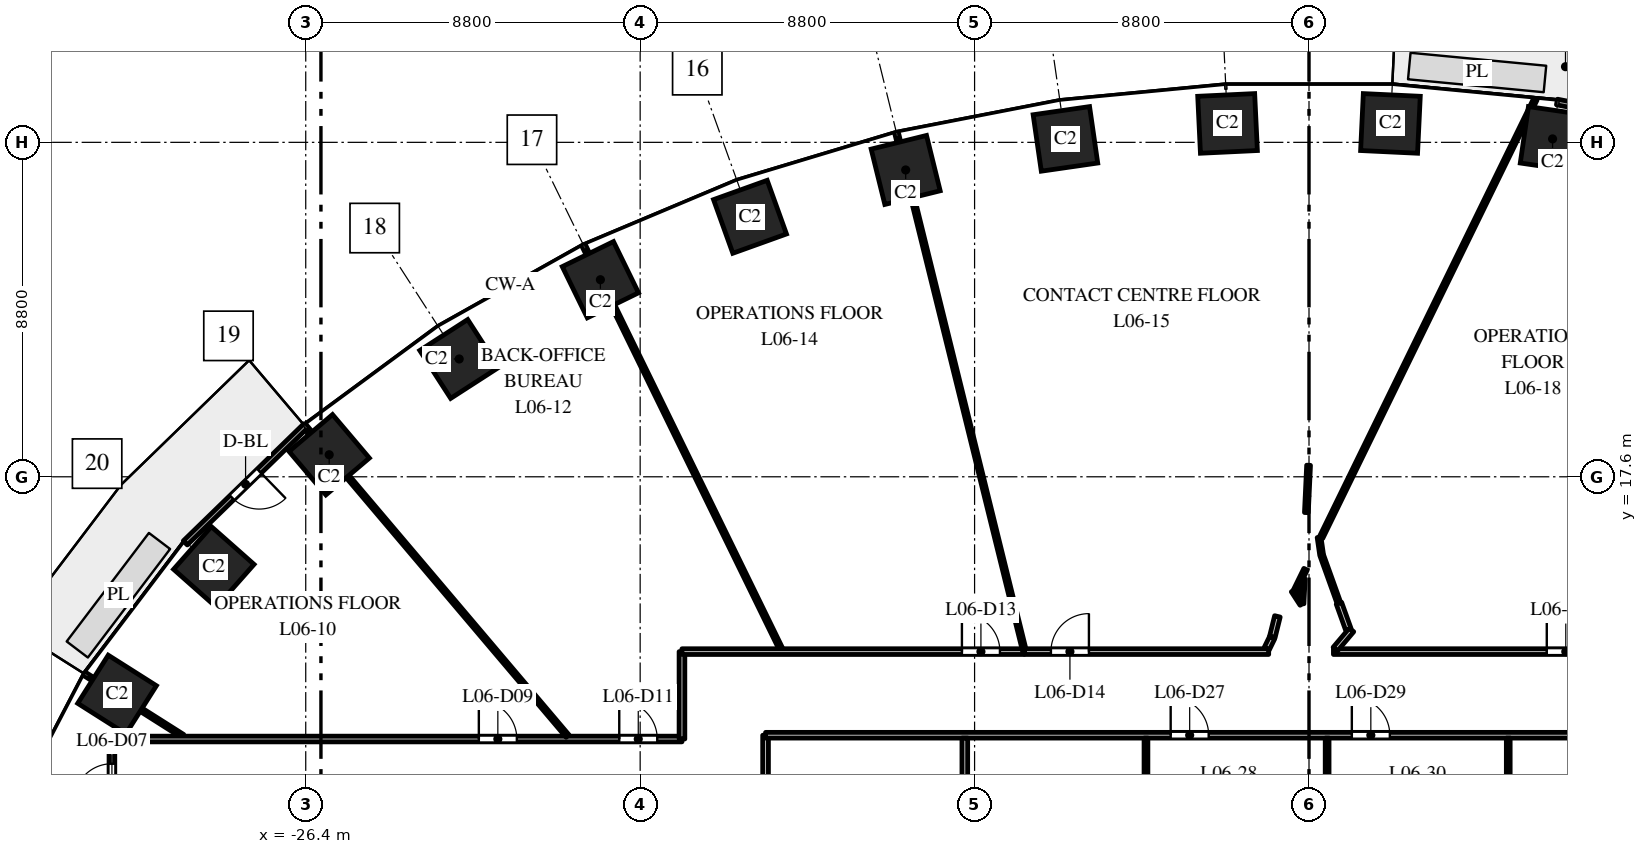
"""IFC4 building model, lengths in metres.
Left out: names, types, materials, properties, quantities, classifications, styles, units other than length and angle.
Written with IfcOpenShell. Run it as: python <this file> out.ifc"""

import sys

from ifc_helpers import new_model, si_unit, direction, frame, frame_2d, origin, origin_2d, place, context, subcontext, project, spatial, rectangle, extrude, element, fill, save


model = new_model("IFC4")
c1 = context("Model", 3, precision=1e-05, world=origin(), true_north=direction((0.0, 1.0)))
c2 = subcontext(c1, "Body", "Model", "MODEL_VIEW")
j1 = project(units=[si_unit("LENGTHUNIT", "METRE"), si_unit("PLANEANGLEUNIT", "RADIAN")], contexts=[c1])
p1 = place(None, origin())
s1 = spatial("IfcSite", under=j1, at=p1, CompositionType="ELEMENT")
p2 = place(p1, origin())
s2 = spatial("IfcBuilding", under=s1, at=p2, CompositionType="ELEMENT")
p3 = place(p2, frame((0.0, 0.0, 34.5)))
s3 = spatial("IfcBuildingStorey", under=s2, at=p3, CompositionType="ELEMENT", Elevation=34.5)
for number, where, z_axis, x_axis in (
    (1, (6.409, 26.491, 0.0), (0.0, 0.0, 1.0), (-0.99, 0.143, 0.0)),
    (2, (2.143, 26.898, 0.0), (0.0, 0.0, 1.0), (-0.999, 0.048, 0.0)),
    (3, (-2.143, 26.898, 0.0), (0.0, 0.0, 1.0), (-0.999, -0.048, 0.0)),
    (4, (-6.409, 26.491, 0.0), (0.0, 0.0, 1.0), (-0.99, -0.143, 0.0)),
    (5, (-10.613, 25.674, 0.0), (0.0, 0.0, 1.0), (-0.971, -0.24, 0.0)),
    (6, (-14.709, 24.441, 0.0), (0.0, 0.0, 1.0), (-0.941, -0.338, 0.0)),
    (7, (-18.646, 22.785, 0.0), (0.0, 0.0, 1.0), (-0.898, -0.439, 0.0)),
    (8, (-22.362, 20.7, 0.0), (0.0, 0.0, 1.0), (-0.84, -0.542, 0.0)),
    (9, (-25.783, 18.18, 0.0), (0.0, 0.0, 1.0), (-0.763, -0.646, 0.0)),
    (10, (-28.819, 15.23, 0.0), (0.0, 0.0, 1.0), (-0.663, -0.749, 0.0)),
    (11, (-31.365, 11.871, 0.0), (0.0, 0.0, 1.0), (-0.535, -0.845, 0.0)),
):
    element("IfcColumn", number, at=place(p3, frame(where, z_axis=z_axis, x_axis=x_axis)), inside=s3, PredefinedType="COLUMN", context=c2, shape_type="SweptSolid", body=[
        extrude(rectangle(XDim=1.5, YDim=1.5, at=origin_2d()), origin(), (0.0, 0.0, 1.0), 4.0),
    ])
p4 = place(p3, frame((10.871, 26.617, 0.0), z_axis=(0.0, 0.0, 1.0), x_axis=(-0.981631174778, 0.190788460615, 0.0)))
e12 = element("IfcWall", 12, at=p4, inside=s3, PredefinedType="STANDARD", context=c2, shape_type="SweptSolid", body=[
    extrude(rectangle(XDim=4.426, YDim=0.15, at=frame_2d((2.213, 0.0))), origin(), (0.0, 0.0, 1.0), 3.7),
])
p5 = place(p4, frame((1.713, 0.0, 0.0)))
e13 = element("IfcOpeningElement", 13, at=p5, cuts=e12, PredefinedType="OPENING", context=c2, shape_type="SweptSolid", body=[
    extrude(rectangle(XDim=1.0, YDim=2.4, at=frame_2d((0.5, 1.2))), frame((0.0, 0.085, 0.0), z_axis=(0.0, -1.0, 0.0), x_axis=(1.0, 0.0, 0.0)), (0.0, 0.0, 1.0), 0.17),
])
p6 = place(p3, frame((-26.396, 18.943, 0.0), z_axis=(0.0, 0.0, 1.0), x_axis=(-0.717214761864, -0.696852197647, 0.0)))
e14 = element("IfcWall", 14, at=p6, inside=s3, PredefinedType="STANDARD", context=c2, shape_type="SweptSolid", body=[
    extrude(rectangle(XDim=4.424, YDim=0.15, at=frame_2d((2.212, 0.0))), origin(), (0.0, 0.0, 1.0), 3.7),
])
p7 = place(p6, frame((1.712, 0.0, 0.0)))
e15 = element("IfcOpeningElement", 15, at=p7, cuts=e14, PredefinedType="OPENING", context=c2, shape_type="SweptSolid", body=[
    extrude(rectangle(XDim=1.0, YDim=2.4, at=frame_2d((0.5, 1.2))), frame((0.0, 0.085, 0.0), z_axis=(0.0, -1.0, 0.0), x_axis=(1.0, 0.0, 0.0)), (0.0, 0.0, 1.0), 0.17),
])
p8 = place(p3, frame((-32.212, 12.408, 0.0), z_axis=(0.0, 0.0, 1.0), x_axis=(0.844810627195, -0.535065420467, 0.0)))
e16 = element("IfcWall", 16, at=p8, inside=s3, PredefinedType="PARTITIONING", context=c2, shape_type="SweptSolid", body=[
    extrude(rectangle(XDim=3.048, YDim=0.1, at=frame_2d((1.524, 0.0))), origin(), (0.0, 0.0, 1.0), 3.7),
])
p9 = place(p3, frame((-31.5, 8.5, 0.0), z_axis=(0.0, 0.0, 1.0), x_axis=(0.0, 1.0, 0.0)))
e17 = element("IfcWall", 17, at=p9, inside=s3, PredefinedType="PARTITIONING", context=c2, shape_type="SweptSolid", body=[
    extrude(rectangle(XDim=2.2, YDim=0.15, at=frame_2d((1.1, 0.0))), origin(), (0.0, 0.0, 1.0), 3.7),
])
p10 = place(p9, frame((0.55, 0.0, 0.0)))
e18 = element("IfcOpeningElement", 18, at=p10, cuts=e17, PredefinedType="OPENING", context=c2, shape_type="SweptSolid", body=[
    extrude(rectangle(XDim=1.0, YDim=2.1, at=frame_2d((0.5, 1.05))), frame((0.0, 0.085, 0.0), z_axis=(0.0, -1.0, 0.0), x_axis=(1.0, 0.0, 0.0)), (0.0, 0.0, 1.0), 0.17),
])
p11 = place(p3, frame((-31.5, 10.7, 0.0), z_axis=(0.0, 0.0, 1.0), x_axis=(1.0, 0.0, 0.0)))
e19 = element("IfcWall", 19, at=p11, inside=s3, PredefinedType="PARTITIONING", context=c2, shape_type="SweptSolid", body=[
    extrude(rectangle(XDim=15.0, YDim=0.15, at=frame_2d((7.5, 0.0))), origin(), (0.0, 0.0, 1.0), 3.1),
])
p12 = place(p11, frame((9.655, 0.0, 0.0)))
e20 = element("IfcOpeningElement", 20, at=p12, cuts=e19, PredefinedType="OPENING", context=c2, shape_type="SweptSolid", body=[
    extrude(rectangle(XDim=1.0, YDim=2.1, at=frame_2d((0.5, 1.05))), frame((0.0, 0.085, 0.0), z_axis=(0.0, -1.0, 0.0), x_axis=(1.0, 0.0, 0.0)), (0.0, 0.0, 1.0), 0.17),
])
p13 = place(p11, frame((13.35, 0.0, 0.0)))
e21 = element("IfcOpeningElement", 21, at=p13, cuts=e19, PredefinedType="OPENING", context=c2, shape_type="SweptSolid", body=[
    extrude(rectangle(XDim=1.0, YDim=2.1, at=frame_2d((0.5, 1.05))), frame((0.0, 0.085, 0.0), z_axis=(0.0, -1.0, 0.0), x_axis=(1.0, 0.0, 0.0)), (0.0, 0.0, 1.0), 0.17),
])
p14 = place(p3, frame((-26.43, 18.945, 0.0), z_axis=(0.0, 0.0, 1.0), x_axis=(0.646400187952, -0.762998556365, 0.0)))
e22 = element("IfcWall", 22, at=p14, inside=s3, PredefinedType="PARTITIONING", context=c2, shape_type="SweptSolid", body=[
    extrude(rectangle(XDim=10.704, YDim=0.1, at=frame_2d((5.352, 0.0))), origin(), (0.0, 0.0, 1.0), 3.7),
])
p15 = place(p3, frame((-19.086, 23.685, 0.0), z_axis=(0.0, 0.0, 1.0), x_axis=(0.439199750603, -0.898389436197, 0.0)))
e23 = element("IfcWall", 23, at=p15, inside=s3, PredefinedType="PARTITIONING", context=c2, shape_type="SweptSolid", body=[
    extrude(rectangle(XDim=11.81, YDim=0.1, at=frame_2d((5.905, 0.0))), origin(), (0.0, 0.0, 1.0), 3.7),
])
p16 = place(p3, frame((-16.5, 10.7, 0.0), z_axis=(0.0, 0.0, 1.0), x_axis=(0.0, 1.0, 0.0)))
e24 = element("IfcWall", 24, at=p16, inside=s3, PredefinedType="PARTITIONING", context=c2, shape_type="SweptSolid", body=[
    extrude(rectangle(XDim=2.3, YDim=0.15, at=frame_2d((1.15, 0.0))), origin(), (0.0, 0.0, 1.0), 2.75),
])
p17 = place(p3, frame((-16.5, 13.0, 0.0), z_axis=(0.0, 0.0, 1.0), x_axis=(1.0, 0.0, 0.0)))
e25 = element("IfcWall", 25, at=p17, inside=s3, PredefinedType="PARTITIONING", context=c2, shape_type="SweptSolid", body=[
    extrude(rectangle(XDim=9.001, YDim=0.15, at=frame_2d((4.5, 0.0))), origin(), (0.0, 0.0, 1.0), 2.85),
])
p18 = place(p17, frame((7.367, 0.0, 0.0)))
e26 = element("IfcOpeningElement", 26, at=p18, cuts=e25, PredefinedType="OPENING", context=c2, shape_type="SweptSolid", body=[
    extrude(rectangle(XDim=1.0, YDim=2.1, at=frame_2d((0.5, 1.05))), frame((0.0, 0.085, 0.0), z_axis=(0.0, -1.0, 0.0), x_axis=(1.0, 0.0, 0.0)), (0.0, 0.0, 1.0), 0.17),
])
p19 = place(p3, frame((-14.3, -10.8, 0.0), z_axis=(0.0, 0.0, 1.0), x_axis=(0.0, 1.0, 0.0)))
e27 = element("IfcWall", 27, at=p19, inside=s3, PredefinedType="PARTITIONING", context=c2, shape_type="SweptSolid", body=[
    extrude(rectangle(XDim=21.6, YDim=0.15, at=frame_2d((10.8, 0.0))), origin(), (0.0, 0.0, 1.0), 2.75),
])
p20 = place(p19, frame((0.65, 0.0, 0.0)))
e28 = element("IfcOpeningElement", 28, at=p20, cuts=e27, PredefinedType="OPENING", context=c2, shape_type="SweptSolid", body=[
    extrude(rectangle(XDim=1.0, YDim=2.1, at=frame_2d((0.5, 1.05))), frame((0.0, 0.085, 0.0), z_axis=(0.0, -1.0, 0.0), x_axis=(1.0, 0.0, 0.0)), (0.0, 0.0, 1.0), 0.17),
])
p21 = place(p3, frame((-14.3, 10.8, 0.0), z_axis=(0.0, 0.0, 1.0), x_axis=(1.0, 0.0, 0.0)))
e29 = element("IfcWall", 29, at=p21, inside=s3, PredefinedType="PARTITIONING", context=c2, shape_type="SweptSolid", body=[
    extrude(rectangle(XDim=28.6, YDim=0.15, at=frame_2d((14.3, 0.0))), origin(), (0.0, 0.0, 1.0), 2.85),
])
p22 = place(p21, frame((10.66, 0.0, 0.0)))
e30 = element("IfcOpeningElement", 30, at=p22, cuts=e29, PredefinedType="OPENING", context=c2, shape_type="SweptSolid", body=[
    extrude(rectangle(XDim=1.0, YDim=2.1, at=frame_2d((0.5, 1.05))), frame((0.0, 0.085, 0.0), z_axis=(0.0, -1.0, 0.0), x_axis=(1.0, 0.0, 0.0)), (0.0, 0.0, 1.0), 0.17),
])
p23 = place(p21, frame((15.427, 0.0, 0.0)))
e31 = element("IfcOpeningElement", 31, at=p23, cuts=e29, PredefinedType="OPENING", context=c2, shape_type="SweptSolid", body=[
    extrude(rectangle(XDim=1.0, YDim=2.1, at=frame_2d((0.5, 1.05))), frame((0.0, 0.085, 0.0), z_axis=(0.0, -1.0, 0.0), x_axis=(1.0, 0.0, 0.0)), (0.0, 0.0, 1.0), 0.17),
])
p24 = place(p21, frame((22.693, 0.0, 0.0)))
e32 = element("IfcOpeningElement", 32, at=p24, cuts=e29, PredefinedType="OPENING", context=c2, shape_type="SweptSolid", body=[
    extrude(rectangle(XDim=1.0, YDim=2.1, at=frame_2d((0.5, 1.05))), frame((0.0, 0.085, 0.0), z_axis=(0.0, -1.0, 0.0), x_axis=(1.0, 0.0, 0.0)), (0.0, 0.0, 1.0), 0.17),
])
p25 = place(p3, frame((-10.853, 26.646, 0.0), z_axis=(0.0, 0.0, 1.0), x_axis=(0.239763745499, -0.97083126564, 0.0)))
e33 = element("IfcWall", 33, at=p25, inside=s3, PredefinedType="PARTITIONING", context=c2, shape_type="SweptSolid", body=[
    extrude(rectangle(XDim=14.056, YDim=0.1, at=frame_2d((7.028, 0.0))), origin(), (0.0, 0.0, 1.0), 2.85),
])
p26 = place(p3, frame((-9.057, 0.045, 0.0), z_axis=(0.0, 0.0, 1.0), x_axis=(0.0, 1.0, 0.0)))
e34 = element("IfcWall", 34, at=p26, inside=s3, PredefinedType="PARTITIONING", context=c2, shape_type="SweptSolid", body=[
    extrude(rectangle(XDim=10.68, YDim=0.15, at=frame_2d((5.34, 0.0))), origin(), (0.0, 0.0, 1.0), 2.75),
])
p27 = place(p26, frame((4.61, 0.0, 0.0)))
e35 = element("IfcOpeningElement", 35, at=p27, cuts=e34, PredefinedType="OPENING", context=c2, shape_type="SweptSolid", body=[
    extrude(rectangle(XDim=1.0, YDim=2.1, at=frame_2d((0.5, 1.05))), frame((0.0, 0.085, 0.0), z_axis=(0.0, -1.0, 0.0), x_axis=(1.0, 0.0, 0.0)), (0.0, 0.0, 1.0), 0.17),
])
p28 = place(p3, frame((-7.483, 13.0, 0.0), z_axis=(0.0, 0.0, 1.0), x_axis=(1.0, 0.0, 0.0)))
e36 = element("IfcWall", 36, at=p28, inside=s3, PredefinedType="PARTITIONING", context=c2, shape_type="SweptSolid", body=[
    extrude(rectangle(XDim=6.422, YDim=0.15, at=frame_2d((3.211, 0.0))), origin(), (0.0, 0.0, 1.0), 2.85),
])
p29 = place(p28, frame((0.692, 0.0, 0.0)))
e37 = element("IfcOpeningElement", 37, at=p29, cuts=e36, PredefinedType="OPENING", context=c2, shape_type="SweptSolid", body=[
    extrude(rectangle(XDim=1.0, YDim=2.1, at=frame_2d((0.5, 1.05))), frame((0.0, 0.085, 0.0), z_axis=(0.0, -1.0, 0.0), x_axis=(1.0, 0.0, 0.0)), (0.0, 0.0, 1.0), 0.17),
])
p30 = place(p3, frame((-4.29, 6.568, 0.0), z_axis=(0.0, 0.0, 1.0), x_axis=(0.0, 1.0, 0.0)))
e38 = element("IfcWall", 38, at=p30, inside=s3, PredefinedType="PARTITIONING", context=c2, shape_type="SweptSolid", body=[
    extrude(rectangle(XDim=4.157, YDim=0.1, at=frame_2d((2.079, 0.0))), origin(), (0.0, 0.0, 1.0), 2.85),
])
p31 = place(p3, frame((-1.111, 13.079, 0.0), z_axis=(0.0, 0.0, 1.0), x_axis=(0.440240923942, 0.897879685084, 0.0)))
e39 = element("IfcWall", 39, at=p31, inside=s3, PredefinedType="PARTITIONING", context=c2, shape_type="SweptSolid", body=[
    extrude(rectangle(XDim=0.323, YDim=0.15, at=frame_2d((0.161, 0.0))), origin(), (0.0, 0.0, 1.0), 2.85),
])
p32 = place(p3, frame((-0.965, 13.386, 0.0), z_axis=(0.0, 0.0, 1.0), x_axis=(0.240473799965, 0.970655629732, 0.0)))
e40 = element("IfcWall", 40, at=p32, inside=s3, PredefinedType="PARTITIONING", context=c2, shape_type="SweptSolid", body=[
    extrude(rectangle(XDim=0.557, YDim=0.15, at=frame_2d((0.279, 0.0))), origin(), (0.0, 0.0, 1.0), 2.85),
])
p33 = place(p3, frame((-0.423, 14.602, 0.0), z_axis=(0.0, 0.0, 1.0), x_axis=(0.543729850084, -0.839260299387, 0.0)))
e41 = element("IfcWall", 41, at=p33, inside=s3, PredefinedType="PARTITIONING", context=c2, shape_type="SweptSolid", body=[
    extrude(rectangle(XDim=0.423, YDim=0.1, at=frame_2d((0.211, 0.0))), origin(), (0.0, 0.0, 1.0), 3.7),
])
p34 = place(p3, frame((-0.365, 14.605, 0.0), z_axis=(0.0, 0.0, 1.0), x_axis=(0.43877676088, 0.898596101767, 0.0)))
e42 = element("IfcWall", 42, at=p34, inside=s3, PredefinedType="PARTITIONING", context=c2, shape_type="SweptSolid", body=[
    extrude(rectangle(XDim=0.626, YDim=0.1, at=frame_2d((0.313, 0.0))), origin(), (0.0, 0.0, 1.0), 3.7),
])
p35 = place(p3, frame((-0.184, 14.26, 0.0), z_axis=(0.0, 0.0, 1.0), x_axis=(0.048551210017, 0.998820694622, 0.0)))
e43 = element("IfcWall", 43, at=p35, inside=s3, PredefinedType="PARTITIONING", context=c2, shape_type="SweptSolid", body=[
    extrude(rectangle(XDim=0.659, YDim=0.1, at=frame_2d((0.329, 0.0))), origin(), (0.0, 0.0, 1.0), 3.7),
])
p36 = place(p3, frame((-0.069, 16.658, 0.0), z_axis=(0.0, 0.0, 1.0), x_axis=(0.046725861685, 0.99890775042, 0.0)))
e44 = element("IfcWall", 44, at=p36, inside=s3, PredefinedType="PARTITIONING", context=c2, shape_type="SweptSolid", body=[
    extrude(rectangle(XDim=0.428, YDim=0.1, at=frame_2d((0.214, 0.0))), origin(), (0.0, 0.0, 1.0), 3.7),
])
p37 = place(p3, frame((-0.048, 17.103, 0.0), z_axis=(0.0, 0.0, 1.0), x_axis=(0.046334071415, 0.998926000175, 0.0)))
e45 = element("IfcWall", 45, at=p37, inside=s3, PredefinedType="PARTITIONING", context=c2, shape_type="SweptSolid", body=[
    extrude(rectangle(XDim=0.801, YDim=0.1, at=frame_2d((0.4, 0.0))), origin(), (0.0, 0.0, 1.0), 3.7),
])
p38 = place(p3, frame((0.265, 16.008, 0.0), z_axis=(0.0, 0.0, 1.0), x_axis=(0.143728876455, -0.989617102759, 0.0)))
e46 = element("IfcWall", 46, at=p38, inside=s3, PredefinedType="PARTITIONING", context=c2, shape_type="SweptSolid", body=[
    extrude(rectangle(XDim=0.474, YDim=0.1, at=frame_2d((0.237, 0.0))), origin(), (0.0, 0.0, 1.0), 3.7),
])
p39 = place(p3, frame((0.317, 16.0, 0.0), z_axis=(0.0, 0.0, 1.0), x_axis=(0.43922717886, 0.898376026701, 0.0)))
e47 = element("IfcWall", 47, at=p39, inside=s3, PredefinedType="PARTITIONING", context=c2, shape_type="SweptSolid", body=[
    extrude(rectangle(XDim=12.843, YDim=0.1, at=frame_2d((6.422, 0.0))), origin(), (0.0, 0.0, 1.0), 2.85),
])
p40 = place(p3, frame((0.34, 15.521, 0.0), z_axis=(0.0, 0.0, 1.0), x_axis=(0.338134523253, -0.941097786728, 0.0)))
e48 = element("IfcWall", 48, at=p40, inside=s3, PredefinedType="PARTITIONING", context=c2, shape_type="SweptSolid", body=[
    extrude(rectangle(XDim=1.315, YDim=0.1, at=frame_2d((0.658, 0.0))), origin(), (0.0, 0.0, 1.0), 3.7),
])
p41 = place(p3, frame((0.477, 7.468, 0.0), z_axis=(0.0, 0.0, 1.0), x_axis=(0.0, 1.0, 0.0)))
e49 = element("IfcWall", 49, at=p41, inside=s3, PredefinedType="PARTITIONING", context=c2, shape_type="SweptSolid", body=[
    extrude(rectangle(XDim=3.257, YDim=0.1, at=frame_2d((1.628, 0.0))), origin(), (0.0, 0.0, 1.0), 2.85),
])
p42 = place(p3, frame((0.643, 13.0, 0.0), z_axis=(0.0, 0.0, 1.0), x_axis=(1.0, 0.0, 0.0)))
e50 = element("IfcWall", 50, at=p42, inside=s3, PredefinedType="PARTITIONING", context=c2, shape_type="SweptSolid", body=[
    extrude(rectangle(XDim=7.404, YDim=0.15, at=frame_2d((3.702, 0.0))), origin(), (0.0, 0.0, 1.0), 2.85),
])
p43 = place(p42, frame((5.614, 0.0, 0.0)))
e51 = element("IfcOpeningElement", 51, at=p43, cuts=e50, PredefinedType="OPENING", context=c2, shape_type="SweptSolid", body=[
    extrude(rectangle(XDim=1.0, YDim=2.1, at=frame_2d((0.5, 1.05))), frame((0.0, 0.085, 0.0), z_axis=(0.0, -1.0, 0.0), x_axis=(1.0, 0.0, 0.0)), (0.0, 0.0, 1.0), 0.17),
])
p44 = place(p3, frame((0.692, 13.065, 0.0), z_axis=(0.0, 0.0, 1.0), x_axis=(0.645925733167, 0.763400253623, 0.0)))
e52 = element("IfcWall", 52, at=p44, inside=s3, PredefinedType="PARTITIONING", context=c2, shape_type="SweptSolid", body=[
    extrude(rectangle(XDim=0.663, YDim=0.15, at=frame_2d((0.332, 0.0))), origin(), (0.0, 0.0, 1.0), 3.7),
])
p45 = place(p3, frame((0.788, 14.273, 0.0), z_axis=(0.0, 0.0, 1.0), x_axis=(0.338541598468, -0.940951426008, 0.0)))
e53 = element("IfcWall", 53, at=p45, inside=s3, PredefinedType="PARTITIONING", context=c2, shape_type="SweptSolid", body=[
    extrude(rectangle(XDim=0.729, YDim=0.15, at=frame_2d((0.365, 0.0))), origin(), (0.0, 0.0, 1.0), 3.7),
])
p46 = place(p3, frame((5.243, 6.059, 0.0), z_axis=(0.0, 0.0, 1.0), x_axis=(0.0, 1.0, 0.0)))
e54 = element("IfcWall", 54, at=p46, inside=s3, PredefinedType="PARTITIONING", context=c2, shape_type="SweptSolid", body=[
    extrude(rectangle(XDim=4.666, YDim=0.1, at=frame_2d((2.333, 0.0))), origin(), (0.0, 0.0, 1.0), 2.85),
])
p47 = place(p7, origin())
e55 = element("IfcDoor", 55, at=p47, inside=s3, OperationType="SINGLE_SWING_LEFT", PredefinedType="DOOR", context=c2, shape_type="SweptSolid", body=[
    extrude(rectangle(XDim=1.0, YDim=2.4, at=frame_2d((0.5, 1.2))), frame((0.0, 0.025, 0.0), z_axis=(0.0, -1.0, 0.0), x_axis=(1.0, 0.0, 0.0)), (0.0, 0.0, 1.0), 0.05),
])
fill(e15, e55)
p48 = place(p10, origin())
e56 = element("IfcDoor", 56, at=p48, inside=s3, OperationType="SINGLE_SWING_LEFT", PredefinedType="DOOR", context=c2, shape_type="SweptSolid", body=[
    extrude(rectangle(XDim=1.0, YDim=2.1, at=frame_2d((0.5, 1.05))), frame((0.0, 0.025, 0.0), z_axis=(0.0, -1.0, 0.0), x_axis=(1.0, 0.0, 0.0)), (0.0, 0.0, 1.0), 0.05),
])
fill(e18, e56)
p49 = place(p12, origin())
e57 = element("IfcDoor", 57, at=p49, inside=s3, OperationType="SINGLE_SWING_LEFT", PredefinedType="DOOR", context=c2, shape_type="SweptSolid", body=[
    extrude(rectangle(XDim=1.0, YDim=2.1, at=frame_2d((0.5, 1.05))), frame((0.0, 0.025, 0.0), z_axis=(0.0, -1.0, 0.0), x_axis=(1.0, 0.0, 0.0)), (0.0, 0.0, 1.0), 0.05),
])
fill(e20, e57)
p50 = place(p13, origin())
e58 = element("IfcDoor", 58, at=p50, inside=s3, OperationType="SINGLE_SWING_LEFT", PredefinedType="DOOR", context=c2, shape_type="SweptSolid", body=[
    extrude(rectangle(XDim=1.0, YDim=2.1, at=frame_2d((0.5, 1.05))), frame((0.0, 0.025, 0.0), z_axis=(0.0, -1.0, 0.0), x_axis=(1.0, 0.0, 0.0)), (0.0, 0.0, 1.0), 0.05),
])
fill(e21, e58)
p51 = place(p18, origin())
e59 = element("IfcDoor", 59, at=p51, inside=s3, OperationType="SINGLE_SWING_LEFT", PredefinedType="DOOR", context=c2, shape_type="SweptSolid", body=[
    extrude(rectangle(XDim=1.0, YDim=2.1, at=frame_2d((0.5, 1.05))), frame((0.0, 0.025, 0.0), z_axis=(0.0, -1.0, 0.0), x_axis=(1.0, 0.0, 0.0)), (0.0, 0.0, 1.0), 0.05),
])
fill(e26, e59)
p52 = place(p29, origin())
e60 = element("IfcDoor", 60, at=p52, inside=s3, OperationType="SINGLE_SWING_RIGHT", PredefinedType="DOOR", context=c2, shape_type="SweptSolid", body=[
    extrude(rectangle(XDim=1.0, YDim=2.1, at=frame_2d((0.5, 1.05))), frame((0.0, 0.025, 0.0), z_axis=(0.0, -1.0, 0.0), x_axis=(1.0, 0.0, 0.0)), (0.0, 0.0, 1.0), 0.05),
])
fill(e37, e60)
p53 = place(p43, origin())
e61 = element("IfcDoor", 61, at=p53, inside=s3, OperationType="SINGLE_SWING_LEFT", PredefinedType="DOOR", context=c2, shape_type="SweptSolid", body=[
    extrude(rectangle(XDim=1.0, YDim=2.1, at=frame_2d((0.5, 1.05))), frame((0.0, 0.025, 0.0), z_axis=(0.0, -1.0, 0.0), x_axis=(1.0, 0.0, 0.0)), (0.0, 0.0, 1.0), 0.05),
])
fill(e51, e61)
p54 = place(p22, origin())
e62 = element("IfcDoor", 62, at=p54, inside=s3, OperationType="SINGLE_SWING_LEFT", PredefinedType="DOOR", context=c2, shape_type="SweptSolid", body=[
    extrude(rectangle(XDim=1.0, YDim=2.1, at=frame_2d((0.5, 1.05))), frame((0.0, 0.025, 0.0), z_axis=(0.0, -1.0, 0.0), x_axis=(1.0, 0.0, 0.0)), (0.0, 0.0, 1.0), 0.05),
])
fill(e30, e62)
p55 = place(p23, origin())
e63 = element("IfcDoor", 63, at=p55, inside=s3, OperationType="SINGLE_SWING_LEFT", PredefinedType="DOOR", context=c2, shape_type="SweptSolid", body=[
    extrude(rectangle(XDim=1.0, YDim=2.1, at=frame_2d((0.5, 1.05))), frame((0.0, 0.025, 0.0), z_axis=(0.0, -1.0, 0.0), x_axis=(1.0, 0.0, 0.0)), (0.0, 0.0, 1.0), 0.05),
])
fill(e31, e63)
save(model, sys.argv[1])
